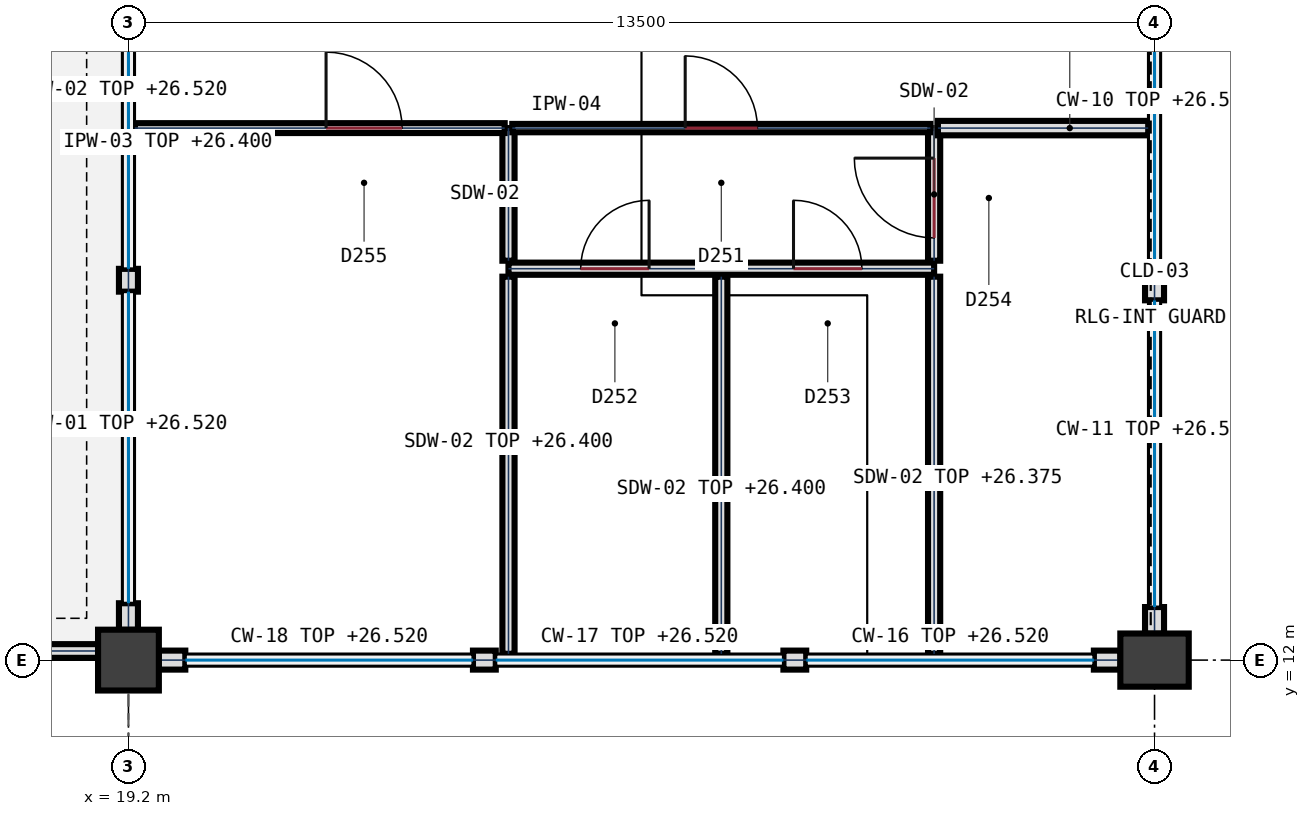
"""IFC4 building model, lengths in metres.
Left out: names, types, materials, properties, quantities, classifications, styles, units other than length and angle.
Written with IfcOpenShell. Run it as: python <this file> out.ifc"""

import sys

from ifc_helpers import new_model, si_unit, direction, frame, frame_2d, origin, origin_2d, place, context, subcontext, project, spatial, rectangle, extrude, element, fill, save


model = new_model("IFC4")
c1 = context("Model", 3, precision=1e-05, world=origin(), true_north=direction((0.0, 1.0)))
c2 = subcontext(c1, "Body", "Model", "MODEL_VIEW")
j1 = project(units=[si_unit("LENGTHUNIT", "METRE"), si_unit("PLANEANGLEUNIT", "RADIAN")], contexts=[c1])
p1 = place(None, origin())
s1 = spatial("IfcSite", under=j1, at=p1, CompositionType="ELEMENT")
p2 = place(p1, origin())
s2 = spatial("IfcBuilding", under=s1, at=p2, CompositionType="ELEMENT")
p3 = place(p2, frame((0.0, 0.0, 23.4)))
s3 = spatial("IfcBuildingStorey", under=s2, at=p3, CompositionType="ELEMENT", Elevation=23.4)
p4 = place(p3, frame((19.2, 12.0, 0.0), z_axis=(0.0, 0.0, 1.0), x_axis=(1.0, 0.0, 0.0)))
e1 = element("IfcColumn", 1, at=p4, inside=s3, PredefinedType="COLUMN", context=c2, shape_type="SweptSolid", body=[
    extrude(rectangle(XDim=0.8, YDim=0.8, at=origin_2d()), origin(), (0.0, 0.0, 1.0), 4.5),
])
p5 = place(p3, frame((32.7, 12.0, 0.0), z_axis=(0.0, 0.0, 1.0), x_axis=(1.0, 0.0, 0.0)))
e2 = element("IfcColumn", 2, at=p5, inside=s3, PredefinedType="COLUMN", context=c2, shape_type="SweptSolid", body=[
    extrude(rectangle(XDim=0.9, YDim=0.7, at=origin_2d()), origin(), (0.0, 0.0, 1.0), 4.5),
])
p6 = place(p3, frame((32.252, 12.0, 0.0), z_axis=(0.0, 0.0, 1.0), x_axis=(-1.0, 0.0, 0.0)))
e3 = element("IfcWall", 3, at=p6, inside=s3, PredefinedType="SOLIDWALL", context=c2, shape_type="SweptSolid", body=[
    extrude(rectangle(XDim=0.35, YDim=0.25, at=frame_2d((0.175, 0.0))), origin(), (0.0, 0.0, 1.0), 3.12),
])
p7 = place(p3, frame((19.948, 12.0, 0.0), z_axis=(0.0, 0.0, 1.0), x_axis=(-1.0, 0.0, 0.0)))
e4 = element("IfcWall", 4, at=p7, inside=s3, PredefinedType="SOLIDWALL", context=c2, shape_type="SweptSolid", body=[
    extrude(rectangle(XDim=0.35, YDim=0.25, at=frame_2d((0.175, 0.0))), origin(), (0.0, 0.0, 1.0), 3.12),
])
for number, where, z_axis, x_axis in (
    (5, (28.117, 12.0, 0.0), (0.0, 0.0, 1.0), (-1.0, 0.0, 0.0)),
    (6, (24.033, 12.0, 0.0), (0.0, 0.0, 1.0), (-1.0, 0.0, 0.0)),
):
    element("IfcWall", number, at=place(p3, frame(where, z_axis=z_axis, x_axis=x_axis)), inside=s3, PredefinedType="SOLIDWALL", context=c2, shape_type="SweptSolid", body=[
        extrude(rectangle(XDim=0.3, YDim=0.25, at=frame_2d((0.15, 0.0))), origin(), (0.0, 0.0, 1.0), 3.12),
    ])
p8 = place(p3, frame((19.2, 12.398, 0.0), z_axis=(0.0, 0.0, 1.0), x_axis=(0.0, 1.0, 0.0)))
e7 = element("IfcWall", 7, at=p8, inside=s3, PredefinedType="SOLIDWALL", context=c2, shape_type="SweptSolid", body=[
    extrude(rectangle(XDim=0.35, YDim=0.25, at=frame_2d((0.175, 0.0))), origin(), (0.0, 0.0, 1.0), 3.12),
])
p9 = place(p3, frame((19.2, 16.848, 0.0), z_axis=(0.0, 0.0, 1.0), x_axis=(0.0, 1.0, 0.0)))
e8 = element("IfcWall", 8, at=p9, inside=s3, PredefinedType="SOLIDWALL", context=c2, shape_type="SweptSolid", body=[
    extrude(rectangle(XDim=0.3, YDim=0.25, at=frame_2d((0.15, 0.0))), origin(), (0.0, 0.0, 1.0), 3.12),
])
p10 = place(p3, frame((32.7, 12.698, 0.0), z_axis=(0.0, 0.0, 1.0), x_axis=(0.0, -1.0, 0.0)))
e9 = element("IfcWall", 9, at=p10, inside=s3, PredefinedType="SOLIDWALL", context=c2, shape_type="SweptSolid", body=[
    extrude(rectangle(XDim=0.35, YDim=0.25, at=frame_2d((0.175, 0.0))), origin(), (0.0, 0.0, 1.0), 3.12),
])
p11 = place(p3, frame((32.7, 17.034, 0.0), z_axis=(0.0, 0.0, 1.0), x_axis=(0.0, -1.0, 0.0)))
e10 = element("IfcWall", 10, at=p11, inside=s3, PredefinedType="SOLIDWALL", context=c2, shape_type="SweptSolid", body=[
    extrude(rectangle(XDim=0.3, YDim=0.25, at=frame_2d((0.15, 0.0))), origin(), (0.0, 0.0, 1.0), 3.12),
])
p12 = place(p3, frame((0.3, 12.12, 0.0), z_axis=(0.0, 0.0, 1.0), x_axis=(1.0, 0.0, 0.0)))
e11 = element("IfcWall", 11, at=p12, inside=s3, PredefinedType="PARAPET", context=c2, shape_type="SweptSolid", body=[
    extrude(rectangle(XDim=18.6, YDim=0.18, at=frame_2d((9.3, 0.0))), origin(), (0.0, 0.0, 1.0), 1.15),
])
p13 = place(p3, frame((24.2, 17.15, 0.0), z_axis=(0.0, 0.0, 1.0), x_axis=(1.0, 0.0, 0.0)))
e12 = element("IfcWall", 12, at=p13, inside=s3, PredefinedType="PLUMBINGWALL", context=c2, shape_type="SweptSolid", body=[
    extrude(rectangle(XDim=5.6, YDim=0.16, at=frame_2d((2.8, 0.0))), origin(), (0.0, 0.0, 1.0), 3.1),
])
p14 = place(p13, frame((0.95, 0.0, 0.0)))
e13 = element("IfcOpeningElement", 13, at=p14, cuts=e12, PredefinedType="OPENING", context=c2, shape_type="SweptSolid", body=[
    extrude(rectangle(XDim=0.9, YDim=2.1, at=frame_2d((0.45, 1.05))), frame((0.0, 0.09, 0.0), z_axis=(0.0, -1.0, 0.0), x_axis=(1.0, 0.0, 0.0)), (0.0, 0.0, 1.0), 0.18),
])
p15 = place(p13, frame((3.75, 0.0, 0.0)))
e14 = element("IfcOpeningElement", 14, at=p15, cuts=e12, PredefinedType="OPENING", context=c2, shape_type="SweptSolid", body=[
    extrude(rectangle(XDim=0.9, YDim=2.1, at=frame_2d((0.45, 1.05))), frame((0.0, 0.09, 0.0), z_axis=(0.0, -1.0, 0.0), x_axis=(1.0, 0.0, 0.0)), (0.0, 0.0, 1.0), 0.18),
])
p16 = place(p3, frame((24.2, 12.083, 0.0), z_axis=(0.0, 0.0, 1.0), x_axis=(0.0, 1.0, 0.0)))
e15 = element("IfcWall", 15, at=p16, inside=s3, PredefinedType="PLUMBINGWALL", context=c2, shape_type="SweptSolid", body=[
    extrude(rectangle(XDim=4.962, YDim=0.16, at=frame_2d((2.481, 0.0))), origin(), (0.0, 0.0, 1.0), 3.0),
])
p17 = place(p3, frame((24.2, 17.255, 0.0), z_axis=(0.0, 0.0, 1.0), x_axis=(0.0, 1.0, 0.0)))
e16 = element("IfcWall", 16, at=p17, inside=s3, PredefinedType="PLUMBINGWALL", context=c2, shape_type="SweptSolid", body=[
    extrude(rectangle(XDim=1.745, YDim=0.16, at=frame_2d((0.873, 0.0))), origin(), (0.0, 0.0, 1.0), 3.1),
])
p18 = place(p3, frame((27.0, 12.083, 0.0), z_axis=(0.0, 0.0, 1.0), x_axis=(0.0, 1.0, 0.0)))
e17 = element("IfcWall", 17, at=p18, inside=s3, PredefinedType="PLUMBINGWALL", context=c2, shape_type="SweptSolid", body=[
    extrude(rectangle(XDim=4.962, YDim=0.16, at=frame_2d((2.481, 0.0))), origin(), (0.0, 0.0, 1.0), 3.0),
])
p19 = place(p3, frame((29.8, 12.083, 0.0), z_axis=(0.0, 0.0, 1.0), x_axis=(0.0, 1.0, 0.0)))
e18 = element("IfcWall", 18, at=p19, inside=s3, PredefinedType="PLUMBINGWALL", context=c2, shape_type="SweptSolid", body=[
    extrude(rectangle(XDim=4.962, YDim=0.16, at=frame_2d((2.481, 0.0))), origin(), (0.0, 0.0, 1.0), 2.975),
])
p20 = place(p3, frame((29.8, 17.255, 0.0), z_axis=(0.0, 0.0, 1.0), x_axis=(0.0, 1.0, 0.0)))
e19 = element("IfcWall", 19, at=p20, inside=s3, PredefinedType="PLUMBINGWALL", context=c2, shape_type="SweptSolid", body=[
    extrude(rectangle(XDim=1.745, YDim=0.16, at=frame_2d((0.873, 0.0))), origin(), (0.0, 0.0, 1.0), 3.1),
])
p21 = place(p20, frame((0.3, 0.0, 0.0)))
e20 = element("IfcOpeningElement", 20, at=p21, cuts=e19, PredefinedType="OPENING", context=c2, shape_type="SweptSolid", body=[
    extrude(rectangle(XDim=1.05, YDim=2.15, at=frame_2d((0.525, 1.075))), frame((0.0, 0.09, 0.0), z_axis=(0.0, -1.0, 0.0), x_axis=(1.0, 0.0, 0.0)), (0.0, 0.0, 1.0), 0.18),
])
p22 = place(p3, frame((19.283, 19.0, 0.0), z_axis=(0.0, 0.0, 1.0), x_axis=(1.0, 0.0, 0.0)))
e21 = element("IfcWall", 21, at=p22, inside=s3, PredefinedType="PARTITIONING", context=c2, shape_type="SweptSolid", body=[
    extrude(rectangle(XDim=4.867, YDim=0.13, at=frame_2d((2.434, 0.0))), origin(), (0.0, 0.0, 1.0), 3.0),
])
p23 = place(p22, frame((2.517, 0.0, 0.0)))
e22 = element("IfcOpeningElement", 22, at=p23, cuts=e21, PredefinedType="OPENING", context=c2, shape_type="SweptSolid", body=[
    extrude(rectangle(XDim=1.0, YDim=2.2, at=frame_2d((0.5, 1.1))), frame((0.0, 0.075, 0.0), z_axis=(0.0, -1.0, 0.0), x_axis=(1.0, 0.0, 0.0)), (0.0, 0.0, 1.0), 0.15),
])
p24 = place(p3, frame((24.25, 19.0, 0.0), z_axis=(0.0, 0.0, 1.0), x_axis=(1.0, 0.0, 0.0)))
e23 = element("IfcWall", 23, at=p24, inside=s3, PredefinedType="PARTITIONING", context=c2, shape_type="SweptSolid", body=[
    extrude(rectangle(XDim=5.5, YDim=0.11, at=frame_2d((2.75, 0.0))), origin(), (0.0, 0.0, 1.0), 3.1),
])
p25 = place(p24, frame((2.275, 0.0, 0.0)))
e24 = element("IfcOpeningElement", 24, at=p25, cuts=e23, PredefinedType="OPENING", context=c2, shape_type="SweptSolid", body=[
    extrude(rectangle(XDim=0.95, YDim=2.15, at=frame_2d((0.475, 1.075))), frame((0.0, 0.065, 0.0), z_axis=(0.0, -1.0, 0.0), x_axis=(1.0, 0.0, 0.0)), (0.0, 0.0, 1.0), 0.13),
])
p26 = place(p3, frame((29.85, 19.0, 0.0), z_axis=(0.0, 0.0, 1.0), x_axis=(1.0, 0.0, 0.0)))
e25 = element("IfcWall", 25, at=p26, inside=s3, PredefinedType="PARTITIONING", context=c2, shape_type="SweptSolid", body=[
    extrude(rectangle(XDim=2.767, YDim=0.19, at=frame_2d((1.383, 0.0))), origin(), (0.0, 0.0, 1.0), 3.0),
])
p27 = place(p25, origin())
e26 = element("IfcDoor", 26, at=p27, inside=s3, OperationType="SINGLE_SWING_LEFT", PredefinedType="DOOR", context=c2, shape_type="SweptSolid", body=[
    extrude(rectangle(XDim=0.95, YDim=2.15, at=frame_2d((0.475, 1.075))), frame((0.0, 0.032, 0.0), z_axis=(0.0, -1.0, 0.0), x_axis=(1.0, 0.0, 0.0)), (0.0, 0.0, 1.0), 0.065),
])
fill(e24, e26)
p28 = place(p14, origin())
e27 = element("IfcDoor", 27, at=p28, inside=s3, OperationType="SINGLE_SWING_RIGHT", PredefinedType="DOOR", context=c2, shape_type="SweptSolid", body=[
    extrude(rectangle(XDim=0.9, YDim=2.1, at=frame_2d((0.45, 1.05))), frame((0.0, 0.032, 0.0), z_axis=(0.0, -1.0, 0.0), x_axis=(1.0, 0.0, 0.0)), (0.0, 0.0, 1.0), 0.065),
])
fill(e13, e27)
p29 = place(p15, origin())
e28 = element("IfcDoor", 28, at=p29, inside=s3, OperationType="SINGLE_SWING_LEFT", PredefinedType="DOOR", context=c2, shape_type="SweptSolid", body=[
    extrude(rectangle(XDim=0.9, YDim=2.1, at=frame_2d((0.45, 1.05))), frame((0.0, 0.032, 0.0), z_axis=(0.0, -1.0, 0.0), x_axis=(1.0, 0.0, 0.0)), (0.0, 0.0, 1.0), 0.065),
])
fill(e14, e28)
p30 = place(p21, origin())
e29 = element("IfcDoor", 29, at=p30, inside=s3, OperationType="SINGLE_SWING_RIGHT", PredefinedType="DOOR", context=c2, shape_type="SweptSolid", body=[
    extrude(rectangle(XDim=1.05, YDim=2.15, at=frame_2d((0.525, 1.075))), frame((0.0, 0.032, 0.0), z_axis=(0.0, -1.0, 0.0), x_axis=(1.0, 0.0, 0.0)), (0.0, 0.0, 1.0), 0.065),
])
fill(e20, e29)
p31 = place(p23, origin())
e30 = element("IfcDoor", 30, at=p31, inside=s3, OperationType="SINGLE_SWING_LEFT", PredefinedType="DOOR", context=c2, shape_type="SweptSolid", body=[
    extrude(rectangle(XDim=1.0, YDim=2.2, at=frame_2d((0.5, 1.1))), frame((0.0, 0.032, 0.0), z_axis=(0.0, -1.0, 0.0), x_axis=(1.0, 0.0, 0.0)), (0.0, 0.0, 1.0), 0.065),
])
fill(e22, e30)
save(model, sys.argv[1])
